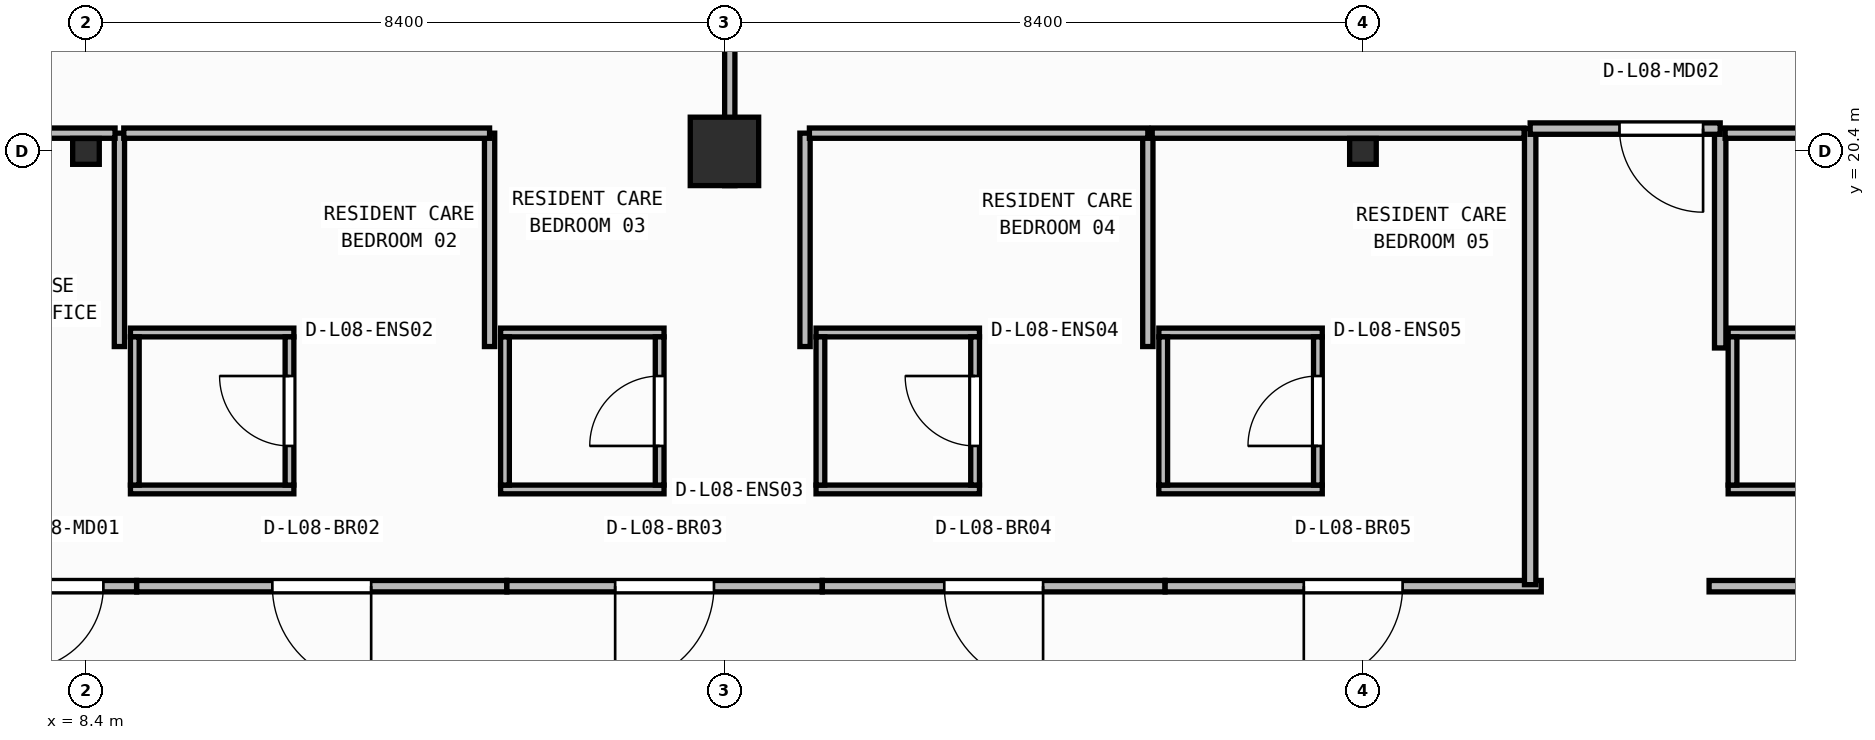
"""IFC4 building model, lengths in metres.
Left out: names, types, materials, properties, quantities, classifications, styles, units other than length and angle.
Written with IfcOpenShell. Run it as: python <this file> out.ifc"""

import sys

from ifc_helpers import new_model, si_unit, direction, frame, frame_2d, origin, origin_2d, place, context, subcontext, project, spatial, rectangle, i_section, extrude, element, fill, save


model = new_model("IFC4")
c1 = context("Model", 3, precision=1e-05, world=origin(), true_north=direction((0.0, 1.0)))
c2 = subcontext(c1, "Body", "Model", "MODEL_VIEW")
j1 = project(units=[si_unit("LENGTHUNIT", "METRE"), si_unit("PLANEANGLEUNIT", "RADIAN")], contexts=[c1])
p1 = place(None, origin())
s1 = spatial("IfcSite", under=j1, at=p1, CompositionType="ELEMENT")
p2 = place(p1, origin())
s2 = spatial("IfcBuilding", under=s1, at=p2, CompositionType="ELEMENT")
p3 = place(p2, frame((0.0, 0.0, 34.35)))
s3 = spatial("IfcBuildingStorey", under=s2, at=p3, CompositionType="ELEMENT", Elevation=34.35)
p4 = place(p3, frame((8.4, 20.4, 0.0), z_axis=(0.0, 0.0, 1.0), x_axis=(1.0, 0.0, 0.0)))
e1 = element("IfcColumn", 1, at=p4, inside=s3, PredefinedType="COLUMN", context=c2, shape_type="SweptSolid", body=[
    extrude(i_section(OverallWidth=0.35, OverallDepth=0.34, WebThickness=0.016, FlangeThickness=0.028, at=origin_2d()), origin(), (0.0, 0.0, 1.0), 3.95),
])
p5 = place(p3, frame((16.8, 20.4, 0.0), z_axis=(0.0, 0.0, 1.0), x_axis=(1.0, 0.0, 0.0)))
e2 = element("IfcColumn", 2, at=p5, inside=s3, PredefinedType="COLUMN", context=c2, shape_type="SweptSolid", body=[
    extrude(rectangle(XDim=0.9, YDim=0.9, at=origin_2d()), origin(), (0.0, 0.0, 1.0), 3.95),
])
p6 = place(p3, frame((25.2, 20.4, 0.0), z_axis=(0.0, 0.0, 1.0), x_axis=(1.0, 0.0, 0.0)))
e3 = element("IfcColumn", 3, at=p6, inside=s3, PredefinedType="COLUMN", context=c2, shape_type="SweptSolid", body=[
    extrude(i_section(OverallWidth=0.35, OverallDepth=0.34, WebThickness=0.016, FlangeThickness=0.028, at=origin_2d()), origin(), (0.0, 0.0, 1.0), 3.95),
])
for number, where, z_axis, x_axis in (
    (4, (8.985, 15.952, 0.0), (0.0, 0.0, 1.0), (1.0, 0.0, 0.0)),
    (5, (8.985, 18.018, 0.0), (0.0, 0.0, 1.0), (1.0, 0.0, 0.0)),
):
    element("IfcWall", number, at=place(p3, frame(where, z_axis=z_axis, x_axis=x_axis)), inside=s3, PredefinedType="PARTITIONING", context=c2, shape_type="SweptSolid", body=[
        extrude(rectangle(XDim=2.15, YDim=0.115, at=frame_2d((1.075, 0.0))), origin(), (0.0, 0.0, 1.0), 3.71),
    ])
p7 = place(p3, frame((9.042, 16.01, 0.0), z_axis=(0.0, 0.0, 1.0), x_axis=(0.0, 1.0, 0.0)))
e6 = element("IfcWall", 6, at=p7, inside=s3, PredefinedType="PARTITIONING", context=c2, shape_type="SweptSolid", body=[
    extrude(rectangle(XDim=1.95, YDim=0.115, at=frame_2d((0.975, 0.0))), origin(), (0.0, 0.0, 1.0), 3.71),
])
p8 = place(p3, frame((11.077, 16.01, 0.0), z_axis=(0.0, 0.0, 1.0), x_axis=(0.0, 1.0, 0.0)))
e7 = element("IfcWall", 7, at=p8, inside=s3, PredefinedType="PARTITIONING", context=c2, shape_type="SweptSolid", body=[
    extrude(rectangle(XDim=1.95, YDim=0.115, at=frame_2d((0.975, 0.0))), origin(), (0.0, 0.0, 1.0), 3.71),
])
p9 = place(p8, frame((0.515, 0.0, 0.0)))
e8 = element("IfcOpeningElement", 8, at=p9, cuts=e7, PredefinedType="OPENING", context=c2, shape_type="SweptSolid", body=[
    extrude(rectangle(XDim=0.92, YDim=2.1, at=frame_2d((0.46, 1.05))), frame((0.0, 0.067, 0.0), z_axis=(0.0, -1.0, 0.0), x_axis=(1.0, 0.0, 0.0)), (0.0, 0.0, 1.0), 0.135),
])
for number, where, z_axis, x_axis in (
    (9, (13.855, 15.952, 0.0), (0.0, 0.0, 1.0), (1.0, 0.0, 0.0)),
    (10, (13.855, 18.018, 0.0), (0.0, 0.0, 1.0), (1.0, 0.0, 0.0)),
):
    element("IfcWall", number, at=place(p3, frame(where, z_axis=z_axis, x_axis=x_axis)), inside=s3, PredefinedType="PARTITIONING", context=c2, shape_type="SweptSolid", body=[
        extrude(rectangle(XDim=2.15, YDim=0.115, at=frame_2d((1.075, 0.0))), origin(), (0.0, 0.0, 1.0), 3.71),
    ])
p10 = place(p3, frame((13.913, 16.01, 0.0), z_axis=(0.0, 0.0, 1.0), x_axis=(0.0, 1.0, 0.0)))
e11 = element("IfcWall", 11, at=p10, inside=s3, PredefinedType="PARTITIONING", context=c2, shape_type="SweptSolid", body=[
    extrude(rectangle(XDim=1.95, YDim=0.115, at=frame_2d((0.975, 0.0))), origin(), (0.0, 0.0, 1.0), 3.71),
])
p11 = place(p3, frame((15.948, 16.01, 0.0), z_axis=(0.0, 0.0, 1.0), x_axis=(0.0, 1.0, 0.0)))
e12 = element("IfcWall", 12, at=p11, inside=s3, PredefinedType="PARTITIONING", context=c2, shape_type="SweptSolid", body=[
    extrude(rectangle(XDim=1.95, YDim=0.115, at=frame_2d((0.975, 0.0))), origin(), (0.0, 0.0, 1.0), 3.71),
])
p12 = place(p11, frame((0.515, 0.0, 0.0)))
e13 = element("IfcOpeningElement", 13, at=p12, cuts=e12, PredefinedType="OPENING", context=c2, shape_type="SweptSolid", body=[
    extrude(rectangle(XDim=0.92, YDim=2.1, at=frame_2d((0.46, 1.05))), frame((0.0, 0.067, 0.0), z_axis=(0.0, -1.0, 0.0), x_axis=(1.0, 0.0, 0.0)), (0.0, 0.0, 1.0), 0.135),
])
for number, where, z_axis, x_axis in (
    (14, (18.005, 15.952, 0.0), (0.0, 0.0, 1.0), (1.0, 0.0, 0.0)),
    (15, (18.005, 18.018, 0.0), (0.0, 0.0, 1.0), (1.0, 0.0, 0.0)),
):
    element("IfcWall", number, at=place(p3, frame(where, z_axis=z_axis, x_axis=x_axis)), inside=s3, PredefinedType="PARTITIONING", context=c2, shape_type="SweptSolid", body=[
        extrude(rectangle(XDim=2.15, YDim=0.115, at=frame_2d((1.075, 0.0))), origin(), (0.0, 0.0, 1.0), 3.71),
    ])
p13 = place(p3, frame((18.062, 16.01, 0.0), z_axis=(0.0, 0.0, 1.0), x_axis=(0.0, 1.0, 0.0)))
e16 = element("IfcWall", 16, at=p13, inside=s3, PredefinedType="PARTITIONING", context=c2, shape_type="SweptSolid", body=[
    extrude(rectangle(XDim=1.95, YDim=0.115, at=frame_2d((0.975, 0.0))), origin(), (0.0, 0.0, 1.0), 3.71),
])
p14 = place(p3, frame((20.097, 16.01, 0.0), z_axis=(0.0, 0.0, 1.0), x_axis=(0.0, 1.0, 0.0)))
e17 = element("IfcWall", 17, at=p14, inside=s3, PredefinedType="PARTITIONING", context=c2, shape_type="SweptSolid", body=[
    extrude(rectangle(XDim=1.95, YDim=0.115, at=frame_2d((0.975, 0.0))), origin(), (0.0, 0.0, 1.0), 3.71),
])
p15 = place(p14, frame((0.515, 0.0, 0.0)))
e18 = element("IfcOpeningElement", 18, at=p15, cuts=e17, PredefinedType="OPENING", context=c2, shape_type="SweptSolid", body=[
    extrude(rectangle(XDim=0.92, YDim=2.1, at=frame_2d((0.46, 1.05))), frame((0.0, 0.067, 0.0), z_axis=(0.0, -1.0, 0.0), x_axis=(1.0, 0.0, 0.0)), (0.0, 0.0, 1.0), 0.135),
])
for number, where, z_axis, x_axis in (
    (19, (22.515, 15.952, 0.0), (0.0, 0.0, 1.0), (1.0, 0.0, 0.0)),
    (20, (22.515, 18.018, 0.0), (0.0, 0.0, 1.0), (1.0, 0.0, 0.0)),
):
    element("IfcWall", number, at=place(p3, frame(where, z_axis=z_axis, x_axis=x_axis)), inside=s3, PredefinedType="PARTITIONING", context=c2, shape_type="SweptSolid", body=[
        extrude(rectangle(XDim=2.15, YDim=0.115, at=frame_2d((1.075, 0.0))), origin(), (0.0, 0.0, 1.0), 3.71),
    ])
p16 = place(p3, frame((22.573, 16.01, 0.0), z_axis=(0.0, 0.0, 1.0), x_axis=(0.0, 1.0, 0.0)))
e21 = element("IfcWall", 21, at=p16, inside=s3, PredefinedType="PARTITIONING", context=c2, shape_type="SweptSolid", body=[
    extrude(rectangle(XDim=1.95, YDim=0.115, at=frame_2d((0.975, 0.0))), origin(), (0.0, 0.0, 1.0), 3.71),
])
p17 = place(p3, frame((24.607, 16.01, 0.0), z_axis=(0.0, 0.0, 1.0), x_axis=(0.0, 1.0, 0.0)))
e22 = element("IfcWall", 22, at=p17, inside=s3, PredefinedType="PARTITIONING", context=c2, shape_type="SweptSolid", body=[
    extrude(rectangle(XDim=1.95, YDim=0.115, at=frame_2d((0.975, 0.0))), origin(), (0.0, 0.0, 1.0), 3.71),
])
p18 = place(p17, frame((0.515, 0.0, 0.0)))
e23 = element("IfcOpeningElement", 23, at=p18, cuts=e22, PredefinedType="OPENING", context=c2, shape_type="SweptSolid", body=[
    extrude(rectangle(XDim=0.92, YDim=2.1, at=frame_2d((0.46, 1.05))), frame((0.0, 0.067, 0.0), z_axis=(0.0, -1.0, 0.0), x_axis=(1.0, 0.0, 0.0)), (0.0, 0.0, 1.0), 0.135),
])
p19 = place(p3, frame((30.005, 15.952, 0.0), z_axis=(0.0, 0.0, 1.0), x_axis=(1.0, 0.0, 0.0)))
e24 = element("IfcWall", 24, at=p19, inside=s3, PredefinedType="PARTITIONING", context=c2, shape_type="SweptSolid", body=[
    extrude(rectangle(XDim=2.15, YDim=0.115, at=frame_2d((1.075, 0.0))), origin(), (0.0, 0.0, 1.0), 3.478),
])
p20 = place(p3, frame((30.005, 18.018, 0.0), z_axis=(0.0, 0.0, 1.0), x_axis=(1.0, 0.0, 0.0)))
e25 = element("IfcWall", 25, at=p20, inside=s3, PredefinedType="PARTITIONING", context=c2, shape_type="SweptSolid", body=[
    extrude(rectangle(XDim=2.15, YDim=0.115, at=frame_2d((1.075, 0.0))), origin(), (0.0, 0.0, 1.0), 3.71),
])
p21 = place(p3, frame((30.062, 16.01, 0.0), z_axis=(0.0, 0.0, 1.0), x_axis=(0.0, 1.0, 0.0)))
e26 = element("IfcWall", 26, at=p21, inside=s3, PredefinedType="PARTITIONING", context=c2, shape_type="SweptSolid", body=[
    extrude(rectangle(XDim=1.95, YDim=0.115, at=frame_2d((0.975, 0.0))), origin(), (0.0, 0.0, 1.0), 3.71),
])
p22 = place(p3, frame((9.066, 14.68, 0.0), z_axis=(0.0, 0.0, 1.0), x_axis=(-1.0, 0.0, 0.0)))
e27 = element("IfcWall", 27, at=p22, inside=s3, PredefinedType="PARTITIONING", context=c2, shape_type="SweptSolid", body=[
    extrude(rectangle(XDim=1.974, YDim=0.15, at=frame_2d((0.987, 0.0))), origin(), (0.0, 0.0, 1.0), 3.71),
])
p23 = place(p22, frame((0.437, 0.0, 0.0)))
e28 = element("IfcOpeningElement", 28, at=p23, cuts=e27, PredefinedType="OPENING", context=c2, shape_type="SweptSolid", body=[
    extrude(rectangle(XDim=1.1, YDim=2.1, at=frame_2d((0.55, 1.05))), frame((0.0, 0.085, 0.0), z_axis=(0.0, -1.0, 0.0), x_axis=(1.0, 0.0, 0.0)), (0.0, 0.0, 1.0), 0.17),
])
p24 = place(p3, frame((13.936, 14.68, 0.0), z_axis=(0.0, 0.0, 1.0), x_axis=(-1.0, 0.0, 0.0)))
e29 = element("IfcWall", 29, at=p24, inside=s3, PredefinedType="PARTITIONING", context=c2, shape_type="SweptSolid", body=[
    extrude(rectangle(XDim=4.868, YDim=0.15, at=frame_2d((2.434, 0.0))), origin(), (0.0, 0.0, 1.0), 3.71),
])
p25 = place(p24, frame((1.784, 0.0, 0.0)))
e30 = element("IfcOpeningElement", 30, at=p25, cuts=e29, PredefinedType="OPENING", context=c2, shape_type="SweptSolid", body=[
    extrude(rectangle(XDim=1.3, YDim=2.15, at=frame_2d((0.65, 1.075))), frame((0.0, 0.085, 0.0), z_axis=(0.0, -1.0, 0.0), x_axis=(1.0, 0.0, 0.0)), (0.0, 0.0, 1.0), 0.17),
])
p26 = place(p3, frame((18.086, 14.68, 0.0), z_axis=(0.0, 0.0, 1.0), x_axis=(-1.0, 0.0, 0.0)))
e31 = element("IfcWall", 31, at=p26, inside=s3, PredefinedType="PARTITIONING", context=c2, shape_type="SweptSolid", body=[
    extrude(rectangle(XDim=4.148, YDim=0.15, at=frame_2d((2.074, 0.0))), origin(), (0.0, 0.0, 1.0), 3.71),
])
p27 = place(p26, frame((1.424, 0.0, 0.0)))
e32 = element("IfcOpeningElement", 32, at=p27, cuts=e31, PredefinedType="OPENING", context=c2, shape_type="SweptSolid", body=[
    extrude(rectangle(XDim=1.3, YDim=2.15, at=frame_2d((0.65, 1.075))), frame((0.0, 0.085, 0.0), z_axis=(0.0, -1.0, 0.0), x_axis=(1.0, 0.0, 0.0)), (0.0, 0.0, 1.0), 0.17),
])
p28 = place(p3, frame((22.596, 14.68, 0.0), z_axis=(0.0, 0.0, 1.0), x_axis=(-1.0, 0.0, 0.0)))
e33 = element("IfcWall", 33, at=p28, inside=s3, PredefinedType="PARTITIONING", context=c2, shape_type="SweptSolid", body=[
    extrude(rectangle(XDim=4.508, YDim=0.15, at=frame_2d((2.254, 0.0))), origin(), (0.0, 0.0, 1.0), 3.71),
])
p29 = place(p28, frame((1.604, 0.0, 0.0)))
e34 = element("IfcOpeningElement", 34, at=p29, cuts=e33, PredefinedType="OPENING", context=c2, shape_type="SweptSolid", body=[
    extrude(rectangle(XDim=1.3, YDim=2.15, at=frame_2d((0.65, 1.075))), frame((0.0, 0.085, 0.0), z_axis=(0.0, -1.0, 0.0), x_axis=(1.0, 0.0, 0.0)), (0.0, 0.0, 1.0), 0.17),
])
p30 = place(p3, frame((27.546, 14.68, 0.0), z_axis=(0.0, 0.0, 1.0), x_axis=(-1.0, 0.0, 0.0)))
e35 = element("IfcWall", 35, at=p30, inside=s3, PredefinedType="PARTITIONING", context=c2, shape_type="SweptSolid", body=[
    extrude(rectangle(XDim=4.948, YDim=0.15, at=frame_2d((2.474, 0.0))), origin(), (0.0, 0.0, 1.0), 3.71),
])
p31 = place(p30, frame((1.824, 0.0, 0.0)))
e36 = element("IfcOpeningElement", 36, at=p31, cuts=e35, PredefinedType="OPENING", context=c2, shape_type="SweptSolid", body=[
    extrude(rectangle(XDim=1.3, YDim=2.15, at=frame_2d((0.65, 1.075))), frame((0.0, 0.085, 0.0), z_axis=(0.0, -1.0, 0.0), x_axis=(1.0, 0.0, 0.0)), (0.0, 0.0, 1.0), 0.17),
])
p32 = place(p3, frame((35.186, 14.68, 0.0), z_axis=(0.0, 0.0, 1.0), x_axis=(-1.0, 0.0, 0.0)))
e37 = element("IfcWall", 37, at=p32, inside=s3, PredefinedType="PARTITIONING", context=c2, shape_type="SweptSolid", body=[
    extrude(rectangle(XDim=5.432, YDim=0.15, at=frame_2d((2.716, 0.0))), origin(), (0.0, 0.0, 1.0), 3.71),
])
p33 = place(p32, frame((2.066, 0.0, 0.0)))
e38 = element("IfcOpeningElement", 38, at=p33, cuts=e37, PredefinedType="OPENING", context=c2, shape_type="SweptSolid", body=[
    extrude(rectangle(XDim=1.3, YDim=2.15, at=frame_2d((0.65, 1.075))), frame((0.0, 0.085, 0.0), z_axis=(0.0, -1.0, 0.0), x_axis=(1.0, 0.0, 0.0)), (0.0, 0.0, 1.0), 0.17),
])
p34 = place(p3, frame((27.4, 20.7, 0.0), z_axis=(0.0, 0.0, 1.0), x_axis=(0.0, -1.0, 0.0)))
e39 = element("IfcWall", 39, at=p34, inside=s3, PredefinedType="PARTITIONING", context=c2, shape_type="SweptSolid", body=[
    extrude(rectangle(XDim=6.0, YDim=0.15, at=frame_2d((3.0, 0.0))), origin(), (0.0, 0.0, 1.0), 3.71),
])
p35 = place(p3, frame((29.9, 17.814, 0.0), z_axis=(0.0, 0.0, 1.0), x_axis=(0.0, 1.0, 0.0)))
e40 = element("IfcWall", 40, at=p35, inside=s3, PredefinedType="PARTITIONING", context=c2, shape_type="SweptSolid", body=[
    extrude(rectangle(XDim=2.886, YDim=0.15, at=frame_2d((1.443, 0.0))), origin(), (0.0, 0.0, 1.0), 3.71),
])
p36 = place(p3, frame((29.9, 20.7, 0.0), z_axis=(0.0, 0.0, 1.0), x_axis=(-1.0, 0.0, 0.0)))
e41 = element("IfcWall", 41, at=p36, inside=s3, PredefinedType="PARTITIONING", context=c2, shape_type="SweptSolid", body=[
    extrude(rectangle(XDim=2.5, YDim=0.15, at=frame_2d((1.25, 0.0))), origin(), (0.0, 0.0, 1.0), 3.073),
])
p37 = place(p36, frame((0.225, 0.0, 0.0)))
e42 = element("IfcOpeningElement", 42, at=p37, cuts=e41, PredefinedType="OPENING", context=c2, shape_type="SweptSolid", body=[
    extrude(rectangle(XDim=1.1, YDim=2.1, at=frame_2d((0.55, 1.05))), frame((0.0, 0.085, 0.0), z_axis=(0.0, -1.0, 0.0), x_axis=(1.0, 0.0, 0.0)), (0.0, 0.0, 1.0), 0.17),
])
p38 = place(p3, frame((8.84, 17.833, 0.0), z_axis=(0.0, 0.0, 1.0), x_axis=(0.0, 1.0, 0.0)))
e43 = element("IfcWall", 43, at=p38, inside=s3, PredefinedType="PARTITIONING", context=c2, shape_type="SweptSolid", body=[
    extrude(rectangle(XDim=2.807, YDim=0.135, at=frame_2d((1.404, 0.0))), origin(), (0.0, 0.0, 1.0), 3.71),
])
p39 = place(p3, frame((8.782, 20.64, 0.0), z_axis=(0.0, 0.0, 1.0), x_axis=(-1.0, 0.0, 0.0)))
e44 = element("IfcWall", 44, at=p39, inside=s3, PredefinedType="PARTITIONING", context=c2, shape_type="SweptSolid", body=[
    extrude(rectangle(XDim=4.395, YDim=0.135, at=frame_2d((2.198, 0.0))), origin(), (0.0, 0.0, 1.0), 3.073),
])
p40 = place(p39, frame((3.023, 0.0, 0.0)))
e45 = element("IfcOpeningElement", 45, at=p40, cuts=e44, PredefinedType="OPENING", context=c2, shape_type="SweptSolid", body=[
    extrude(rectangle(XDim=1.1, YDim=2.1, at=frame_2d((0.55, 1.05))), frame((0.0, 0.077, 0.0), z_axis=(0.0, -1.0, 0.0), x_axis=(1.0, 0.0, 0.0)), (0.0, 0.0, 1.0), 0.155),
])
p41 = place(p3, frame((13.71, 17.833, 0.0), z_axis=(0.0, 0.0, 1.0), x_axis=(0.0, 1.0, 0.0)))
e46 = element("IfcWall", 46, at=p41, inside=s3, PredefinedType="PARTITIONING", context=c2, shape_type="SweptSolid", body=[
    extrude(rectangle(XDim=2.807, YDim=0.135, at=frame_2d((1.404, 0.0))), origin(), (0.0, 0.0, 1.0), 3.71),
])
p42 = place(p3, frame((13.71, 20.64, 0.0), z_axis=(0.0, 0.0, 1.0), x_axis=(-1.0, 0.0, 0.0)))
e47 = element("IfcWall", 47, at=p42, inside=s3, PredefinedType="PARTITIONING", context=c2, shape_type="SweptSolid", body=[
    extrude(rectangle(XDim=4.812, YDim=0.135, at=frame_2d((2.406, 0.0))), origin(), (0.0, 0.0, 1.0), 3.073),
])
for number, where, z_axis, x_axis in (
    (48, (17.86, 17.833, 0.0), (0.0, 0.0, 1.0), (0.0, 1.0, 0.0)),
    (49, (22.37, 17.833, 0.0), (0.0, 0.0, 1.0), (0.0, 1.0, 0.0)),
):
    element("IfcWall", number, at=place(p3, frame(where, z_axis=z_axis, x_axis=x_axis)), inside=s3, PredefinedType="PARTITIONING", context=c2, shape_type="SweptSolid", body=[
        extrude(rectangle(XDim=2.807, YDim=0.135, at=frame_2d((1.404, 0.0))), origin(), (0.0, 0.0, 1.0), 3.71),
    ])
p43 = place(p3, frame((22.37, 20.64, 0.0), z_axis=(0.0, 0.0, 1.0), x_axis=(-1.0, 0.0, 0.0)))
e50 = element("IfcWall", 50, at=p43, inside=s3, PredefinedType="PARTITIONING", context=c2, shape_type="SweptSolid", body=[
    extrude(rectangle(XDim=4.453, YDim=0.135, at=frame_2d((2.226, 0.0))), origin(), (0.0, 0.0, 1.0), 3.073),
])
p44 = place(p3, frame((27.32, 20.64, 0.0), z_axis=(0.0, 0.0, 1.0), x_axis=(-1.0, 0.0, 0.0)))
e51 = element("IfcWall", 51, at=p44, inside=s3, PredefinedType="PARTITIONING", context=c2, shape_type="SweptSolid", body=[
    extrude(rectangle(XDim=4.893, YDim=0.135, at=frame_2d((2.446, 0.0))), origin(), (0.0, 0.0, 1.0), 3.073),
])
p45 = place(p3, frame((34.96, 20.64, 0.0), z_axis=(0.0, 0.0, 1.0), x_axis=(-1.0, 0.0, 0.0)))
e52 = element("IfcWall", 52, at=p45, inside=s3, PredefinedType="PARTITIONING", context=c2, shape_type="SweptSolid", body=[
    extrude(rectangle(XDim=4.995, YDim=0.135, at=frame_2d((2.498, 0.0))), origin(), (0.0, 0.0, 1.0), 3.073),
])
p46 = place(p3, frame((16.87, 19.95, 0.0), z_axis=(0.0, 0.0, 1.0), x_axis=(0.0, 1.0, 0.0)))
e53 = element("IfcWall", 53, at=p46, inside=s3, PredefinedType="PARTITIONING", context=c2, shape_type="SweptSolid", body=[
    extrude(rectangle(XDim=15.077, YDim=0.135, at=frame_2d((7.539, 0.0))), origin(), (0.0, 0.0, 1.0), 3.073),
])
p47 = place(p9, origin())
e54 = element("IfcDoor", 54, at=p47, inside=s3, OperationType="SINGLE_SWING_RIGHT", PredefinedType="DOOR", context=c2, shape_type="SweptSolid", body=[
    extrude(rectangle(XDim=0.92, YDim=2.1, at=frame_2d((0.46, 1.05))), frame((0.0, 0.025, 0.0), z_axis=(0.0, -1.0, 0.0), x_axis=(1.0, 0.0, 0.0)), (0.0, 0.0, 1.0), 0.05),
])
fill(e8, e54)
p48 = place(p12, origin())
e55 = element("IfcDoor", 55, at=p48, inside=s3, OperationType="SINGLE_SWING_LEFT", PredefinedType="DOOR", context=c2, shape_type="SweptSolid", body=[
    extrude(rectangle(XDim=0.92, YDim=2.1, at=frame_2d((0.46, 1.05))), frame((0.0, 0.025, 0.0), z_axis=(0.0, -1.0, 0.0), x_axis=(1.0, 0.0, 0.0)), (0.0, 0.0, 1.0), 0.05),
])
fill(e13, e55)
p49 = place(p15, origin())
e56 = element("IfcDoor", 56, at=p49, inside=s3, OperationType="SINGLE_SWING_RIGHT", PredefinedType="DOOR", context=c2, shape_type="SweptSolid", body=[
    extrude(rectangle(XDim=0.92, YDim=2.1, at=frame_2d((0.46, 1.05))), frame((0.0, 0.025, 0.0), z_axis=(0.0, -1.0, 0.0), x_axis=(1.0, 0.0, 0.0)), (0.0, 0.0, 1.0), 0.05),
])
fill(e18, e56)
p50 = place(p18, origin())
e57 = element("IfcDoor", 57, at=p50, inside=s3, OperationType="SINGLE_SWING_LEFT", PredefinedType="DOOR", context=c2, shape_type="SweptSolid", body=[
    extrude(rectangle(XDim=0.92, YDim=2.1, at=frame_2d((0.46, 1.05))), frame((0.0, 0.025, 0.0), z_axis=(0.0, -1.0, 0.0), x_axis=(1.0, 0.0, 0.0)), (0.0, 0.0, 1.0), 0.05),
])
fill(e23, e57)
p51 = place(p23, origin())
e58 = element("IfcDoor", 58, at=p51, inside=s3, OperationType="SINGLE_SWING_RIGHT", PredefinedType="DOOR", context=c2, shape_type="SweptSolid", body=[
    extrude(rectangle(XDim=1.1, YDim=2.1, at=frame_2d((0.55, 1.05))), frame((0.0, 0.025, 0.0), z_axis=(0.0, -1.0, 0.0), x_axis=(1.0, 0.0, 0.0)), (0.0, 0.0, 1.0), 0.05),
])
fill(e28, e58)
p52 = place(p25, origin())
e59 = element("IfcDoor", 59, at=p52, inside=s3, OperationType="SINGLE_SWING_LEFT", PredefinedType="DOOR", context=c2, shape_type="SweptSolid", body=[
    extrude(rectangle(XDim=1.3, YDim=2.15, at=frame_2d((0.65, 1.075))), frame((0.0, 0.025, 0.0), z_axis=(0.0, -1.0, 0.0), x_axis=(1.0, 0.0, 0.0)), (0.0, 0.0, 1.0), 0.05),
])
fill(e30, e59)
p53 = place(p27, origin())
e60 = element("IfcDoor", 60, at=p53, inside=s3, OperationType="SINGLE_SWING_RIGHT", PredefinedType="DOOR", context=c2, shape_type="SweptSolid", body=[
    extrude(rectangle(XDim=1.3, YDim=2.15, at=frame_2d((0.65, 1.075))), frame((0.0, 0.025, 0.0), z_axis=(0.0, -1.0, 0.0), x_axis=(1.0, 0.0, 0.0)), (0.0, 0.0, 1.0), 0.05),
])
fill(e32, e60)
p54 = place(p29, origin())
e61 = element("IfcDoor", 61, at=p54, inside=s3, OperationType="SINGLE_SWING_LEFT", PredefinedType="DOOR", context=c2, shape_type="SweptSolid", body=[
    extrude(rectangle(XDim=1.3, YDim=2.15, at=frame_2d((0.65, 1.075))), frame((0.0, 0.025, 0.0), z_axis=(0.0, -1.0, 0.0), x_axis=(1.0, 0.0, 0.0)), (0.0, 0.0, 1.0), 0.05),
])
fill(e34, e61)
p55 = place(p31, origin())
e62 = element("IfcDoor", 62, at=p55, inside=s3, OperationType="SINGLE_SWING_RIGHT", PredefinedType="DOOR", context=c2, shape_type="SweptSolid", body=[
    extrude(rectangle(XDim=1.3, YDim=2.15, at=frame_2d((0.65, 1.075))), frame((0.0, 0.025, 0.0), z_axis=(0.0, -1.0, 0.0), x_axis=(1.0, 0.0, 0.0)), (0.0, 0.0, 1.0), 0.05),
])
fill(e36, e62)
p56 = place(p37, origin())
e63 = element("IfcDoor", 63, at=p56, inside=s3, OperationType="SINGLE_SWING_LEFT", PredefinedType="DOOR", context=c2, shape_type="SweptSolid", body=[
    extrude(rectangle(XDim=1.1, YDim=2.1, at=frame_2d((0.55, 1.05))), frame((0.0, 0.025, 0.0), z_axis=(0.0, -1.0, 0.0), x_axis=(1.0, 0.0, 0.0)), (0.0, 0.0, 1.0), 0.05),
])
fill(e42, e63)
save(model, sys.argv[1])
